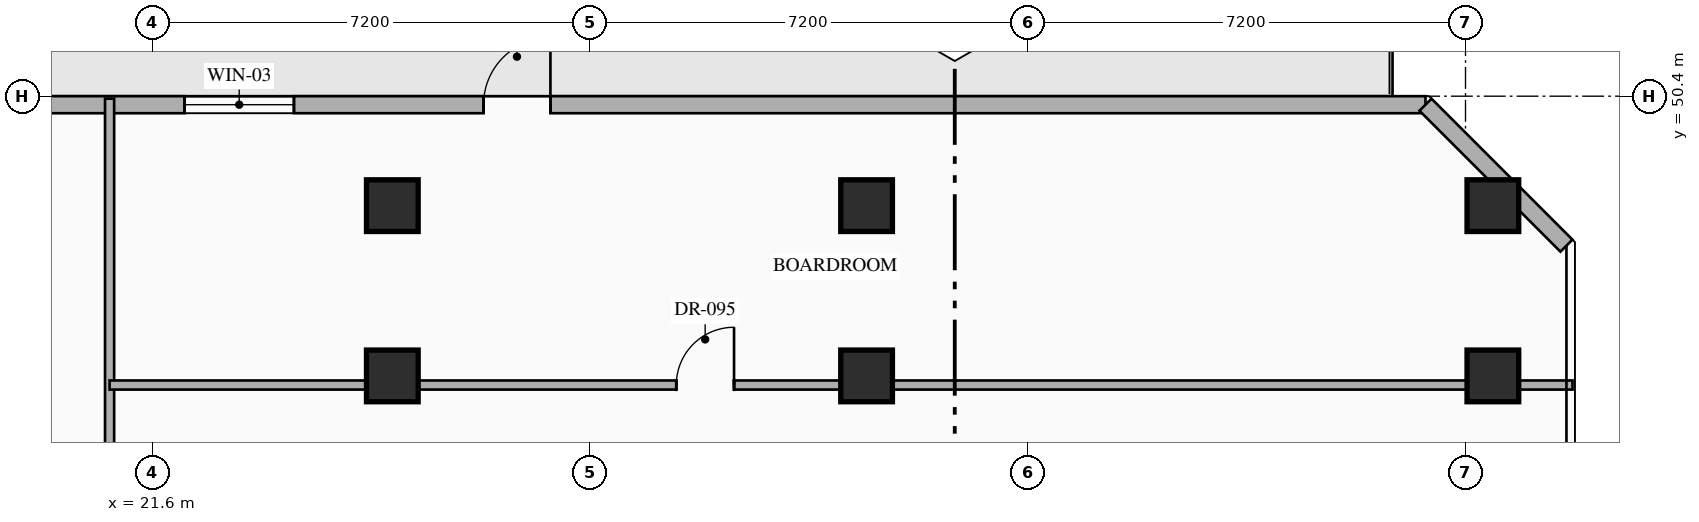
"""IFC4 building model, lengths in metres.
Left out: names, types, materials, properties, quantities, classifications, styles, units other than length and angle.
Written with IfcOpenShell. Run it as: python <this file> out.ifc"""

import sys

from ifc_helpers import new_model, si_unit, direction, frame, frame_2d, origin, origin_2d, place, context, subcontext, project, spatial, rectangle, hollow_rectangle, extrude, element, fill, save


model = new_model("IFC4")
c1 = context("Model", 3, precision=1e-05, world=origin(), true_north=direction((0.0, 1.0)))
c2 = subcontext(c1, "Body", "Model", "MODEL_VIEW")
j1 = project(units=[si_unit("LENGTHUNIT", "METRE"), si_unit("PLANEANGLEUNIT", "RADIAN")], contexts=[c1])
p1 = place(None, origin())
s1 = spatial("IfcSite", under=j1, at=p1, CompositionType="ELEMENT")
p2 = place(p1, origin())
s2 = spatial("IfcBuilding", under=s1, at=p2, CompositionType="ELEMENT")
p3 = place(p2, frame((0.0, 0.0, 152.85)))
s3 = spatial("IfcBuildingStorey", under=s2, at=p3, CompositionType="ELEMENT", Elevation=152.85)
for number, where, z_axis, x_axis in (
    (1, (25.55, 45.8, 0.0), (0.0, 0.0, 1.0), (1.0, 0.0, 0.0)),
    (2, (33.35, 45.8, 0.0), (0.0, 0.0, 1.0), (1.0, 0.0, 0.0)),
    (3, (43.65, 45.8, 0.0), (0.0, 0.0, 1.0), (1.0, 0.0, 0.0)),
    (4, (25.55, 48.6, 0.0), (0.0, 0.0, 1.0), (1.0, 0.0, 0.0)),
    (5, (33.35, 48.6, 0.0), (0.0, 0.0, 1.0), (1.0, 0.0, 0.0)),
    (6, (43.65, 48.6, 0.0), (0.0, 0.0, 1.0), (1.0, 0.0, 0.0)),
):
    element("IfcColumn", number, at=place(p3, frame(where, z_axis=z_axis, x_axis=x_axis)), inside=s3, PredefinedType="COLUMN", context=c2, shape_type="SweptSolid", body=[
        extrude(hollow_rectangle(XDim=0.85, YDim=0.85, WallThickness=0.032, at=origin_2d()), origin(), (0.0, 0.0, 1.0), 3.6),
    ])
p4 = place(p3, frame((12.058, 50.26, 0.0), z_axis=(0.0, 0.0, 1.0), x_axis=(1.0, 0.0, 0.0)))
e7 = element("IfcWall", 7, at=p4, inside=s3, PredefinedType="STANDARD", context=c2, shape_type="SweptSolid", body=[
    extrude(rectangle(XDim=30.484, YDim=0.28, at=frame_2d((15.242, 0.0))), origin(), (0.0, 0.0, 1.0), 3.35),
])
p5 = place(p4, frame((14.992, 0.0, 0.0)))
e8 = element("IfcOpeningElement", 8, at=p5, cuts=e7, PredefinedType="OPENING", context=c2, shape_type="SweptSolid", body=[
    extrude(rectangle(XDim=1.1, YDim=2.2, at=frame_2d((0.55, 1.1))), frame((0.0, 0.15, 0.0), z_axis=(0.0, -1.0, 0.0), x_axis=(1.0, 0.0, 0.0)), (0.0, 0.0, 1.0), 0.3),
])
p6 = place(p4, frame((10.074, 0.0, 0.85)))
e9 = element("IfcOpeningElement", 9, at=p6, cuts=e7, PredefinedType="OPENING", context=c2, shape_type="SweptSolid", body=[
    extrude(rectangle(XDim=1.8, YDim=2.1, at=frame_2d((0.9, 1.05))), frame((0.0, 0.15, 0.0), z_axis=(0.0, -1.0, 0.0), x_axis=(1.0, 0.0, 0.0)), (0.0, 0.0, 1.0), 0.3),
])
p7 = place(p3, frame((42.542, 50.26, 0.0), z_axis=(0.0, 0.0, 1.0), x_axis=(0.707106781187, -0.707106781187, 0.0)))
e10 = element("IfcWall", 10, at=p7, inside=s3, PredefinedType="STANDARD", context=c2, shape_type="SweptSolid", body=[
    extrude(rectangle(XDim=3.278, YDim=0.28, at=frame_2d((1.639, 0.0))), origin(), (0.0, 0.0, 1.0), 3.35),
])
p8 = place(p3, frame((20.9, 23.44, 0.0), z_axis=(0.0, 0.0, 1.0), x_axis=(0.0, 1.0, 0.0)))
e11 = element("IfcWall", 11, at=p8, inside=s3, PredefinedType="PARTITIONING", context=c2, shape_type="SweptSolid", body=[
    extrude(rectangle(XDim=26.92, YDim=0.15, at=frame_2d((13.46, 0.0))), origin(), (0.0, 0.0, 1.0), 3.35),
])
p9 = place(p8, frame((7.943, 0.0, 0.0)))
e12 = element("IfcOpeningElement", 12, at=p9, cuts=e11, PredefinedType="OPENING", context=c2, shape_type="SweptSolid", body=[
    extrude(rectangle(XDim=0.95, YDim=2.15, at=frame_2d((0.475, 1.075))), frame((0.0, 0.085, 0.0), z_axis=(0.0, -1.0, 0.0), x_axis=(1.0, 0.0, 0.0)), (0.0, 0.0, 1.0), 0.17),
])
p10 = place(p3, frame((20.9, 45.65, 0.0), z_axis=(0.0, 0.0, 1.0), x_axis=(1.0, 0.0, 0.0)))
e13 = element("IfcWall", 13, at=p10, inside=s3, PredefinedType="PARTITIONING", context=c2, shape_type="SweptSolid", body=[
    extrude(rectangle(XDim=24.06, YDim=0.15, at=frame_2d((12.03, 0.0))), origin(), (0.0, 0.0, 1.0), 2.695),
])
p11 = place(p10, frame((9.32, 0.0, 0.0)))
e14 = element("IfcOpeningElement", 14, at=p11, cuts=e13, PredefinedType="OPENING", context=c2, shape_type="SweptSolid", body=[
    extrude(rectangle(XDim=0.95, YDim=2.15, at=frame_2d((0.475, 1.075))), frame((0.0, 0.085, 0.0), z_axis=(0.0, -1.0, 0.0), x_axis=(1.0, 0.0, 0.0)), (0.0, 0.0, 1.0), 0.17),
])
p12 = place(p5, origin())
e15 = element("IfcDoor", 15, at=p12, inside=s3, OperationType="SINGLE_SWING_RIGHT", PredefinedType="DOOR", context=c2, shape_type="SweptSolid", body=[
    extrude(rectangle(XDim=1.1, YDim=2.2, at=frame_2d((0.55, 1.1))), frame((0.0, 0.025, 0.0), z_axis=(0.0, -1.0, 0.0), x_axis=(1.0, 0.0, 0.0)), (0.0, 0.0, 1.0), 0.05),
])
fill(e8, e15)
p13 = place(p6, origin())
e16 = element("IfcWindow", 16, at=p13, inside=s3, PartitioningType="SINGLE_PANEL", PredefinedType="WINDOW", context=c2, shape_type="SweptSolid", body=[
    extrude(rectangle(XDim=1.8, YDim=2.1, at=frame_2d((0.9, 1.05))), frame((0.0, 0.03, 0.0), z_axis=(0.0, -1.0, 0.0), x_axis=(1.0, 0.0, 0.0)), (0.0, 0.0, 1.0), 0.06),
])
fill(e9, e16)
p14 = place(p11, origin())
e17 = element("IfcDoor", 17, at=p14, inside=s3, OperationType="SINGLE_SWING_RIGHT", PredefinedType="DOOR", context=c2, shape_type="SweptSolid", body=[
    extrude(rectangle(XDim=0.95, YDim=2.15, at=frame_2d((0.475, 1.075))), frame((0.0, 0.025, 0.0), z_axis=(0.0, -1.0, 0.0), x_axis=(1.0, 0.0, 0.0)), (0.0, 0.0, 1.0), 0.05),
])
fill(e14, e17)
save(model, sys.argv[1])
